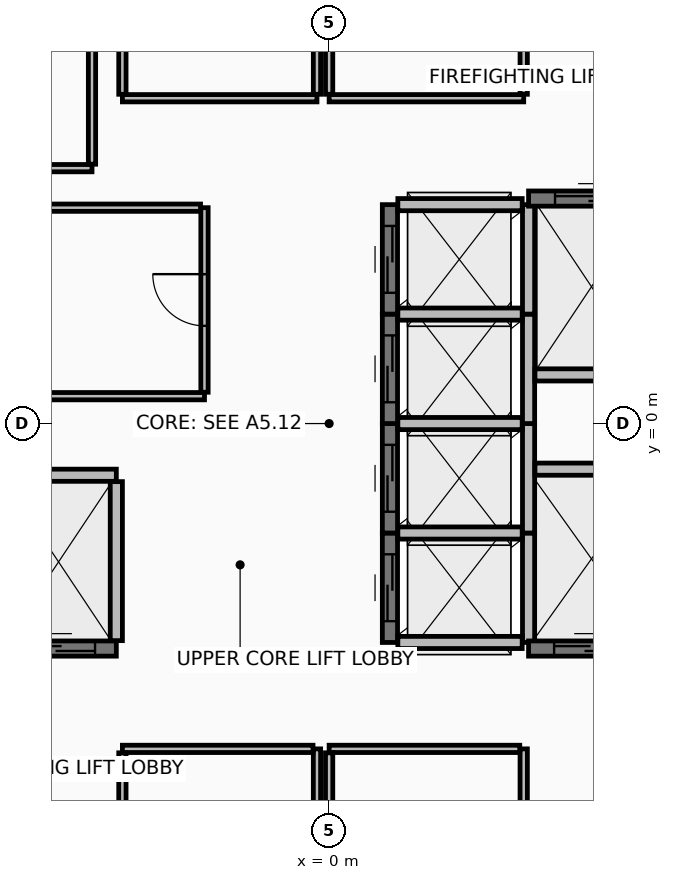
"""IFC4 building model, lengths in metres.
Left out: names, types, materials, properties, quantities, classifications, styles, units other than length and angle.
Written with IfcOpenShell. Run it as: python <this file> out.ifc"""

import sys

from ifc_helpers import new_model, si_unit, direction, frame, frame_2d, origin, place, context, subcontext, project, spatial, rectangle, extrude, element, fill, save


model = new_model("IFC4")
c1 = context("Model", 3, precision=1e-05, world=origin(), true_north=direction((0.0, 1.0)))
c2 = subcontext(c1, "Body", "Model", "MODEL_VIEW")
j1 = project(units=[si_unit("LENGTHUNIT", "METRE"), si_unit("PLANEANGLEUNIT", "RADIAN")], contexts=[c1])
p1 = place(None, origin())
s1 = spatial("IfcSite", under=j1, at=p1, CompositionType="ELEMENT")
p2 = place(p1, origin())
s2 = spatial("IfcBuilding", under=s1, at=p2, CompositionType="ELEMENT")
p3 = place(p2, frame((0.0, 0.0, 257.0)))
s3 = spatial("IfcBuildingStorey", under=s2, at=p3, CompositionType="ELEMENT", Elevation=257.0)
p4 = place(p3, frame((1.0, -3.6, 0.0), z_axis=(0.0, 0.0, 1.0), x_axis=(0.0, 1.0, 0.0)))
e1 = element("IfcWall", 1, at=p4, inside=s3, PredefinedType="SHEAR", context=c2, shape_type="SweptSolid", body=[
    extrude(rectangle(XDim=1.8, YDim=0.25, at=frame_2d((0.9, 0.0))), origin(), (0.0, 0.0, 1.0), 3.42),
])
p5 = place(p4, frame((0.35, 0.0, 0.0)))
e2 = element("IfcOpeningElement", 2, at=p5, cuts=e1, PredefinedType="OPENING", context=c2, shape_type="SweptSolid", body=[
    extrude(rectangle(XDim=1.1, YDim=2.2, at=frame_2d((0.55, 1.1))), frame((0.0, 0.135, 0.0), z_axis=(0.0, -1.0, 0.0), x_axis=(1.0, 0.0, 0.0)), (0.0, 0.0, 1.0), 0.27),
])
p6 = place(p3, frame((3.28, -3.6, 0.0), z_axis=(0.0, 0.0, 1.0), x_axis=(0.0, 1.0, 0.0)))
e3 = element("IfcWall", 3, at=p6, inside=s3, PredefinedType="PARTITIONING", context=c2, shape_type="SweptSolid", body=[
    extrude(rectangle(XDim=1.8, YDim=0.2, at=frame_2d((0.9, 0.0))), origin(), (0.0, 0.0, 1.0), 3.42),
])
for number, where, z_axis, x_axis in (
    (4, (1.13, -3.6, 0.0), (0.0, 0.0, 1.0), (1.0, 0.0, 0.0)),
    (5, (1.13, -1.8, 0.0), (0.0, 0.0, 1.0), (1.0, 0.0, 0.0)),
):
    element("IfcWall", number, at=place(p3, frame(where, z_axis=z_axis, x_axis=x_axis)), inside=s3, PredefinedType="PARTITIONING", context=c2, shape_type="SweptSolid", body=[
        extrude(rectangle(XDim=2.045, YDim=0.2, at=frame_2d((1.022, 0.0))), origin(), (0.0, 0.0, 1.0), 3.42),
    ])
p7 = place(p3, frame((1.0, -1.8, 0.0), z_axis=(0.0, 0.0, 1.0), x_axis=(0.0, 1.0, 0.0)))
e6 = element("IfcWall", 6, at=p7, inside=s3, PredefinedType="SHEAR", context=c2, shape_type="SweptSolid", body=[
    extrude(rectangle(XDim=1.8, YDim=0.25, at=frame_2d((0.9, 0.0))), origin(), (0.0, 0.0, 1.0), 3.42),
])
p8 = place(p7, frame((0.35, 0.0, 0.0)))
e7 = element("IfcOpeningElement", 7, at=p8, cuts=e6, PredefinedType="OPENING", context=c2, shape_type="SweptSolid", body=[
    extrude(rectangle(XDim=1.1, YDim=2.2, at=frame_2d((0.55, 1.1))), frame((0.0, 0.135, 0.0), z_axis=(0.0, -1.0, 0.0), x_axis=(1.0, 0.0, 0.0)), (0.0, 0.0, 1.0), 0.27),
])
p9 = place(p3, frame((3.28, -1.8, 0.0), z_axis=(0.0, 0.0, 1.0), x_axis=(0.0, 1.0, 0.0)))
e8 = element("IfcWall", 8, at=p9, inside=s3, PredefinedType="PARTITIONING", context=c2, shape_type="SweptSolid", body=[
    extrude(rectangle(XDim=1.8, YDim=0.2, at=frame_2d((0.9, 0.0))), origin(), (0.0, 0.0, 1.0), 3.42),
])
p10 = place(p3, frame((1.13, 0.0, 0.0), z_axis=(0.0, 0.0, 1.0), x_axis=(1.0, 0.0, 0.0)))
e9 = element("IfcWall", 9, at=p10, inside=s3, PredefinedType="PARTITIONING", context=c2, shape_type="SweptSolid", body=[
    extrude(rectangle(XDim=2.045, YDim=0.2, at=frame_2d((1.022, 0.0))), origin(), (0.0, 0.0, 1.0), 3.42),
])
p11 = place(p3, frame((1.0, 0.0, 0.0), z_axis=(0.0, 0.0, 1.0), x_axis=(0.0, 1.0, 0.0)))
e10 = element("IfcWall", 10, at=p11, inside=s3, PredefinedType="SHEAR", context=c2, shape_type="SweptSolid", body=[
    extrude(rectangle(XDim=1.8, YDim=0.25, at=frame_2d((0.9, 0.0))), origin(), (0.0, 0.0, 1.0), 3.42),
])
p12 = place(p11, frame((0.35, 0.0, 0.0)))
e11 = element("IfcOpeningElement", 11, at=p12, cuts=e10, PredefinedType="OPENING", context=c2, shape_type="SweptSolid", body=[
    extrude(rectangle(XDim=1.1, YDim=2.2, at=frame_2d((0.55, 1.1))), frame((0.0, 0.135, 0.0), z_axis=(0.0, -1.0, 0.0), x_axis=(1.0, 0.0, 0.0)), (0.0, 0.0, 1.0), 0.27),
])
p13 = place(p3, frame((3.28, 0.0, 0.0), z_axis=(0.0, 0.0, 1.0), x_axis=(0.0, 1.0, 0.0)))
e12 = element("IfcWall", 12, at=p13, inside=s3, PredefinedType="PARTITIONING", context=c2, shape_type="SweptSolid", body=[
    extrude(rectangle(XDim=1.8, YDim=0.2, at=frame_2d((0.9, 0.0))), origin(), (0.0, 0.0, 1.0), 3.42),
])
p14 = place(p3, frame((1.13, 1.8, 0.0), z_axis=(0.0, 0.0, 1.0), x_axis=(1.0, 0.0, 0.0)))
e13 = element("IfcWall", 13, at=p14, inside=s3, PredefinedType="PARTITIONING", context=c2, shape_type="SweptSolid", body=[
    extrude(rectangle(XDim=2.045, YDim=0.2, at=frame_2d((1.022, 0.0))), origin(), (0.0, 0.0, 1.0), 3.42),
])
p15 = place(p3, frame((1.0, 1.8, 0.0), z_axis=(0.0, 0.0, 1.0), x_axis=(0.0, 1.0, 0.0)))
e14 = element("IfcWall", 14, at=p15, inside=s3, PredefinedType="SHEAR", context=c2, shape_type="SweptSolid", body=[
    extrude(rectangle(XDim=1.8, YDim=0.25, at=frame_2d((0.9, 0.0))), origin(), (0.0, 0.0, 1.0), 3.42),
])
p16 = place(p15, frame((0.35, 0.0, 0.0)))
e15 = element("IfcOpeningElement", 15, at=p16, cuts=e14, PredefinedType="OPENING", context=c2, shape_type="SweptSolid", body=[
    extrude(rectangle(XDim=1.1, YDim=2.2, at=frame_2d((0.55, 1.1))), frame((0.0, 0.135, 0.0), z_axis=(0.0, -1.0, 0.0), x_axis=(1.0, 0.0, 0.0)), (0.0, 0.0, 1.0), 0.27),
])
p17 = place(p3, frame((3.28, 1.8, 0.0), z_axis=(0.0, 0.0, 1.0), x_axis=(0.0, 1.0, 0.0)))
e16 = element("IfcWall", 16, at=p17, inside=s3, PredefinedType="PARTITIONING", context=c2, shape_type="SweptSolid", body=[
    extrude(rectangle(XDim=1.8, YDim=0.2, at=frame_2d((0.9, 0.0))), origin(), (0.0, 0.0, 1.0), 3.42),
])
p18 = place(p3, frame((1.13, 3.6, 0.0), z_axis=(0.0, 0.0, 1.0), x_axis=(1.0, 0.0, 0.0)))
e17 = element("IfcWall", 17, at=p18, inside=s3, PredefinedType="PARTITIONING", context=c2, shape_type="SweptSolid", body=[
    extrude(rectangle(XDim=2.045, YDim=0.2, at=frame_2d((1.022, 0.0))), origin(), (0.0, 0.0, 1.0), 2.715),
])
p19 = place(p3, frame((-5.4, -3.7, 0.0), z_axis=(0.0, 0.0, 1.0), x_axis=(1.0, 0.0, 0.0)))
e18 = element("IfcWall", 18, at=p19, inside=s3, PredefinedType="SHEAR", context=c2, shape_type="SweptSolid", body=[
    extrude(rectangle(XDim=1.9, YDim=0.25, at=frame_2d((0.95, 0.0))), origin(), (0.0, 0.0, 1.0), 3.42),
])
p20 = place(p19, frame((0.35, 0.0, 0.0)))
e19 = element("IfcOpeningElement", 19, at=p20, cuts=e18, PredefinedType="OPENING", context=c2, shape_type="SweptSolid", body=[
    extrude(rectangle(XDim=1.2, YDim=2.2, at=frame_2d((0.6, 1.1))), frame((0.0, 0.135, 0.0), z_axis=(0.0, -1.0, 0.0), x_axis=(1.0, 0.0, 0.0)), (0.0, 0.0, 1.0), 0.27),
])
p21 = place(p3, frame((-5.27, -0.85, 0.0), z_axis=(0.0, 0.0, 1.0), x_axis=(1.0, 0.0, 0.0)))
e20 = element("IfcWall", 20, at=p21, inside=s3, PredefinedType="PARTITIONING", context=c2, shape_type="SweptSolid", body=[
    extrude(rectangle(XDim=1.77, YDim=0.2, at=frame_2d((0.885, 0.0))), origin(), (0.0, 0.0, 1.0), 3.42),
])
p22 = place(p3, frame((-3.5, -3.57, 0.0), z_axis=(0.0, 0.0, 1.0), x_axis=(0.0, 1.0, 0.0)))
e21 = element("IfcWall", 21, at=p22, inside=s3, PredefinedType="PARTITIONING", context=c2, shape_type="SweptSolid", body=[
    extrude(rectangle(XDim=2.615, YDim=0.2, at=frame_2d((1.308, 0.0))), origin(), (0.0, 0.0, 1.0), 3.42),
])
p23 = place(p3, frame((3.28, 3.7, 0.0), z_axis=(0.0, 0.0, 1.0), x_axis=(1.0, 0.0, 0.0)))
e22 = element("IfcWall", 22, at=p23, inside=s3, PredefinedType="SHEAR", context=c2, shape_type="SweptSolid", body=[
    extrude(rectangle(XDim=2.07, YDim=0.25, at=frame_2d((1.035, 0.0))), origin(), (0.0, 0.0, 1.0), 3.42),
])
p24 = place(p23, frame((0.435, 0.0, 0.0)))
e23 = element("IfcOpeningElement", 23, at=p24, cuts=e22, PredefinedType="OPENING", context=c2, shape_type="SweptSolid", body=[
    extrude(rectangle(XDim=1.2, YDim=2.2, at=frame_2d((0.6, 1.1))), frame((0.0, 0.135, 0.0), z_axis=(0.0, -1.0, 0.0), x_axis=(1.0, 0.0, 0.0)), (0.0, 0.0, 1.0), 0.27),
])
p25 = place(p3, frame((3.385, 0.8, 0.0), z_axis=(0.0, 0.0, 1.0), x_axis=(1.0, 0.0, 0.0)))
e24 = element("IfcWall", 24, at=p25, inside=s3, PredefinedType="PARTITIONING", context=c2, shape_type="SweptSolid", body=[
    extrude(rectangle(XDim=1.835, YDim=0.2, at=frame_2d((0.917, 0.0))), origin(), (0.0, 0.0, 1.0), 3.42),
])
p26 = place(p3, frame((3.28, -3.7, 0.0), z_axis=(0.0, 0.0, 1.0), x_axis=(1.0, 0.0, 0.0)))
e25 = element("IfcWall", 25, at=p26, inside=s3, PredefinedType="SHEAR", context=c2, shape_type="SweptSolid", body=[
    extrude(rectangle(XDim=1.94, YDim=0.25, at=frame_2d((0.97, 0.0))), origin(), (0.0, 0.0, 1.0), 3.42),
])
p27 = place(p26, frame((0.42, 0.0, 0.0)))
e26 = element("IfcOpeningElement", 26, at=p27, cuts=e25, PredefinedType="OPENING", context=c2, shape_type="SweptSolid", body=[
    extrude(rectangle(XDim=1.1, YDim=2.2, at=frame_2d((0.55, 1.1))), frame((0.0, 0.135, 0.0), z_axis=(0.0, -1.0, 0.0), x_axis=(1.0, 0.0, 0.0)), (0.0, 0.0, 1.0), 0.27),
])
p28 = place(p3, frame((3.385, -0.75, 0.0), z_axis=(0.0, 0.0, 1.0), x_axis=(1.0, 0.0, 0.0)))
e27 = element("IfcWall", 27, at=p28, inside=s3, PredefinedType="PARTITIONING", context=c2, shape_type="SweptSolid", body=[
    extrude(rectangle(XDim=1.835, YDim=0.2, at=frame_2d((0.917, 0.0))), origin(), (0.0, 0.0, 1.0), 3.42),
])
p29 = place(p3, frame((-5.22, 0.45, 0.0), z_axis=(0.0, 0.0, 1.0), x_axis=(1.0, 0.0, 0.0)))
e28 = element("IfcWall", 28, at=p29, inside=s3, PredefinedType="PARTITIONING", context=c2, shape_type="SweptSolid", body=[
    extrude(rectangle(XDim=3.17, YDim=0.12, at=frame_2d((1.585, 0.0))), origin(), (0.0, 0.0, 1.0), 3.42),
])
p30 = place(p3, frame((-2.05, 0.515, 0.0), z_axis=(0.0, 0.0, 1.0), x_axis=(0.0, 1.0, 0.0)))
e29 = element("IfcWall", 29, at=p30, inside=s3, PredefinedType="PARTITIONING", context=c2, shape_type="SweptSolid", body=[
    extrude(rectangle(XDim=3.035, YDim=0.12, at=frame_2d((1.518, 0.0))), origin(), (0.0, 0.0, 1.0), 3.42),
])
p31 = place(p30, frame((1.092, 0.0, 0.0)))
e30 = element("IfcOpeningElement", 30, at=p31, cuts=e29, PredefinedType="OPENING", context=c2, shape_type="SweptSolid", body=[
    extrude(rectangle(XDim=0.85, YDim=2.1, at=frame_2d((0.425, 1.05))), frame((0.0, 0.07, 0.0), z_axis=(0.0, -1.0, 0.0), x_axis=(1.0, 0.0, 0.0)), (0.0, 0.0, 1.0), 0.14),
])
p32 = place(p3, frame((-2.115, 3.55, 0.0), z_axis=(0.0, 0.0, 1.0), x_axis=(-1.0, 0.0, 0.0)))
e31 = element("IfcWall", 31, at=p32, inside=s3, PredefinedType="PARTITIONING", context=c2, shape_type="SweptSolid", body=[
    extrude(rectangle(XDim=3.105, YDim=0.12, at=frame_2d((1.552, 0.0))), origin(), (0.0, 0.0, 1.0), 3.42),
])
p33 = place(p3, frame((-0.2, -7.42, 0.0), z_axis=(0.0, 0.0, 1.0), x_axis=(0.0, 1.0, 0.0)))
e32 = element("IfcWall", 32, at=p33, inside=s3, PredefinedType="PARTITIONING", context=c2, shape_type="SweptSolid", body=[
    extrude(rectangle(XDim=2.07, YDim=0.12, at=frame_2d((1.035, 0.0))), origin(), (0.0, 0.0, 1.0), 2.715),
])
p34 = place(p3, frame((-0.265, -5.35, 0.0), z_axis=(0.0, 0.0, 1.0), x_axis=(-1.0, 0.0, 0.0)))
e33 = element("IfcWall", 33, at=p34, inside=s3, PredefinedType="PARTITIONING", context=c2, shape_type="SweptSolid", body=[
    extrude(rectangle(XDim=3.135, YDim=0.12, at=frame_2d((1.567, 0.0))), origin(), (0.0, 0.0, 1.0), 2.715),
])
p35 = place(p3, frame((-3.4, -5.415, 0.0), z_axis=(0.0, 0.0, 1.0), x_axis=(0.0, -1.0, 0.0)))
e34 = element("IfcWall", 34, at=p35, inside=s3, PredefinedType="PARTITIONING", context=c2, shape_type="SweptSolid", body=[
    extrude(rectangle(XDim=2.8, YDim=0.12, at=frame_2d((1.4, 0.0))), origin(), (0.0, 0.0, 1.0), 2.715),
])
p36 = place(p3, frame((3.2, -8.215, 0.0), z_axis=(0.0, 0.0, 1.0), x_axis=(0.0, 1.0, 0.0)))
e35 = element("IfcWall", 35, at=p36, inside=s3, PredefinedType="PARTITIONING", context=c2, shape_type="SweptSolid", body=[
    extrude(rectangle(XDim=2.865, YDim=0.12, at=frame_2d((1.433, 0.0))), origin(), (0.0, 0.0, 1.0), 2.715),
])
p37 = place(p3, frame((3.135, -5.35, 0.0), z_axis=(0.0, 0.0, 1.0), x_axis=(-1.0, 0.0, 0.0)))
e36 = element("IfcWall", 36, at=p37, inside=s3, PredefinedType="PARTITIONING", context=c2, shape_type="SweptSolid", body=[
    extrude(rectangle(XDim=3.135, YDim=0.12, at=frame_2d((1.567, 0.0))), origin(), (0.0, 0.0, 1.0), 3.42),
])
p38 = place(p3, frame((0.0, -5.415, 0.0), z_axis=(0.0, 0.0, 1.0), x_axis=(0.0, -1.0, 0.0)))
e37 = element("IfcWall", 37, at=p38, inside=s3, PredefinedType="PARTITIONING", context=c2, shape_type="SweptSolid", body=[
    extrude(rectangle(XDim=2.005, YDim=0.12, at=frame_2d((1.002, 0.0))), origin(), (0.0, 0.0, 1.0), 2.715),
])
p39 = place(p3, frame((-3.4, 5.35, 0.0), z_axis=(0.0, 0.0, 1.0), x_axis=(1.0, 0.0, 0.0)))
e38 = element("IfcWall", 38, at=p39, inside=s3, PredefinedType="PARTITIONING", context=c2, shape_type="SweptSolid", body=[
    extrude(rectangle(XDim=3.2, YDim=0.12, at=frame_2d((1.6, 0.0))), origin(), (0.0, 0.0, 1.0), 3.42),
])
p40 = place(p3, frame((-0.2, 5.415, 0.0), z_axis=(0.0, 0.0, 1.0), x_axis=(0.0, 1.0, 0.0)))
e39 = element("IfcWall", 39, at=p40, inside=s3, PredefinedType="PARTITIONING", context=c2, shape_type="SweptSolid", body=[
    extrude(rectangle(XDim=2.005, YDim=0.12, at=frame_2d((1.002, 0.0))), origin(), (0.0, 0.0, 1.0), 2.715),
])
p41 = place(p3, frame((-3.4, 8.215, 0.0), z_axis=(0.0, 0.0, 1.0), x_axis=(0.0, -1.0, 0.0)))
e40 = element("IfcWall", 40, at=p41, inside=s3, PredefinedType="PARTITIONING", context=c2, shape_type="SweptSolid", body=[
    extrude(rectangle(XDim=2.8, YDim=0.12, at=frame_2d((1.4, 0.0))), origin(), (0.0, 0.0, 1.0), 2.715),
])
p42 = place(p3, frame((0.0, 5.35, 0.0), z_axis=(0.0, 0.0, 1.0), x_axis=(1.0, 0.0, 0.0)))
e41 = element("IfcWall", 41, at=p42, inside=s3, PredefinedType="PARTITIONING", context=c2, shape_type="SweptSolid", body=[
    extrude(rectangle(XDim=3.2, YDim=0.12, at=frame_2d((1.6, 0.0))), origin(), (0.0, 0.0, 1.0), 2.715),
])
p43 = place(p3, frame((3.2, 5.415, 0.0), z_axis=(0.0, 0.0, 1.0), x_axis=(0.0, 1.0, 0.0)))
e42 = element("IfcWall", 42, at=p43, inside=s3, PredefinedType="PARTITIONING", context=c2, shape_type="SweptSolid", body=[
    extrude(rectangle(XDim=2.8, YDim=0.12, at=frame_2d((1.4, 0.0))), origin(), (0.0, 0.0, 1.0), 2.715),
])
p44 = place(p3, frame((0.0, 7.42, 0.0), z_axis=(0.0, 0.0, 1.0), x_axis=(0.0, -1.0, 0.0)))
e43 = element("IfcWall", 43, at=p44, inside=s3, PredefinedType="PARTITIONING", context=c2, shape_type="SweptSolid", body=[
    extrude(rectangle(XDim=2.005, YDim=0.12, at=frame_2d((1.002, 0.0))), origin(), (0.0, 0.0, 1.0), 2.715),
])
p45 = place(p3, frame((-7.8, 4.2, 0.0), z_axis=(0.0, 0.0, 1.0), x_axis=(1.0, 0.0, 0.0)))
e44 = element("IfcWall", 44, at=p45, inside=s3, PredefinedType="PARTITIONING", context=c2, shape_type="SweptSolid", body=[
    extrude(rectangle(XDim=3.9, YDim=0.12, at=frame_2d((1.95, 0.0))), origin(), (0.0, 0.0, 1.0), 3.42),
])
p46 = place(p3, frame((-3.9, 4.265, 0.0), z_axis=(0.0, 0.0, 1.0), x_axis=(0.0, 1.0, 0.0)))
e45 = element("IfcWall", 45, at=p46, inside=s3, PredefinedType="PARTITIONING", context=c2, shape_type="SweptSolid", body=[
    extrude(rectangle(XDim=3.95, YDim=0.12, at=frame_2d((1.975, 0.0))), origin(), (0.0, 0.0, 1.0), 2.715),
])
p47 = place(p5, origin())
e46 = element("IfcDoor", 46, at=p47, inside=s3, OperationType="SLIDING_TO_LEFT", PredefinedType="DOOR", context=c2, shape_type="SweptSolid", body=[
    extrude(rectangle(XDim=1.1, YDim=2.2, at=frame_2d((0.55, 1.1))), frame((0.0, 0.025, 0.0), z_axis=(0.0, -1.0, 0.0), x_axis=(1.0, 0.0, 0.0)), (0.0, 0.0, 1.0), 0.05),
])
fill(e2, e46)
p48 = place(p8, origin())
e47 = element("IfcDoor", 47, at=p48, inside=s3, OperationType="SLIDING_TO_LEFT", PredefinedType="DOOR", context=c2, shape_type="SweptSolid", body=[
    extrude(rectangle(XDim=1.1, YDim=2.2, at=frame_2d((0.55, 1.1))), frame((0.0, 0.025, 0.0), z_axis=(0.0, -1.0, 0.0), x_axis=(1.0, 0.0, 0.0)), (0.0, 0.0, 1.0), 0.05),
])
fill(e7, e47)
p49 = place(p12, origin())
e48 = element("IfcDoor", 48, at=p49, inside=s3, OperationType="SLIDING_TO_LEFT", PredefinedType="DOOR", context=c2, shape_type="SweptSolid", body=[
    extrude(rectangle(XDim=1.1, YDim=2.2, at=frame_2d((0.55, 1.1))), frame((0.0, 0.025, 0.0), z_axis=(0.0, -1.0, 0.0), x_axis=(1.0, 0.0, 0.0)), (0.0, 0.0, 1.0), 0.05),
])
fill(e11, e48)
p50 = place(p16, origin())
e49 = element("IfcDoor", 49, at=p50, inside=s3, OperationType="SLIDING_TO_LEFT", PredefinedType="DOOR", context=c2, shape_type="SweptSolid", body=[
    extrude(rectangle(XDim=1.1, YDim=2.2, at=frame_2d((0.55, 1.1))), frame((0.0, 0.025, 0.0), z_axis=(0.0, -1.0, 0.0), x_axis=(1.0, 0.0, 0.0)), (0.0, 0.0, 1.0), 0.05),
])
fill(e15, e49)
p51 = place(p20, origin())
e50 = element("IfcDoor", 50, at=p51, inside=s3, OperationType="SLIDING_TO_RIGHT", PredefinedType="DOOR", context=c2, shape_type="SweptSolid", body=[
    extrude(rectangle(XDim=1.2, YDim=2.2, at=frame_2d((0.6, 1.1))), frame((0.0, 0.025, 0.0), z_axis=(0.0, -1.0, 0.0), x_axis=(1.0, 0.0, 0.0)), (0.0, 0.0, 1.0), 0.05),
])
fill(e19, e50)
p52 = place(p24, origin())
e51 = element("IfcDoor", 51, at=p52, inside=s3, OperationType="SLIDING_TO_RIGHT", PredefinedType="DOOR", context=c2, shape_type="SweptSolid", body=[
    extrude(rectangle(XDim=1.2, YDim=2.2, at=frame_2d((0.6, 1.1))), frame((0.0, 0.025, 0.0), z_axis=(0.0, -1.0, 0.0), x_axis=(1.0, 0.0, 0.0)), (0.0, 0.0, 1.0), 0.05),
])
fill(e23, e51)
p53 = place(p27, origin())
e52 = element("IfcDoor", 52, at=p53, inside=s3, OperationType="SLIDING_TO_LEFT", PredefinedType="DOOR", context=c2, shape_type="SweptSolid", body=[
    extrude(rectangle(XDim=1.1, YDim=2.2, at=frame_2d((0.55, 1.1))), frame((0.0, 0.025, 0.0), z_axis=(0.0, -1.0, 0.0), x_axis=(1.0, 0.0, 0.0)), (0.0, 0.0, 1.0), 0.05),
])
fill(e26, e52)
p54 = place(p31, frame((0.85, 0.0, 0.0), z_axis=(0.0, 0.0, 1.0), x_axis=(-1.0, 0.0, 0.0)))
e53 = element("IfcDoor", 53, at=p54, inside=s3, OperationType="SINGLE_SWING_RIGHT", PredefinedType="DOOR", context=c2, shape_type="SweptSolid", body=[
    extrude(rectangle(XDim=0.85, YDim=2.1, at=frame_2d((0.425, 1.05))), frame((0.0, 0.025, 0.0), z_axis=(0.0, -1.0, 0.0), x_axis=(1.0, 0.0, 0.0)), (0.0, 0.0, 1.0), 0.05),
])
fill(e30, e53)
save(model, sys.argv[1])
